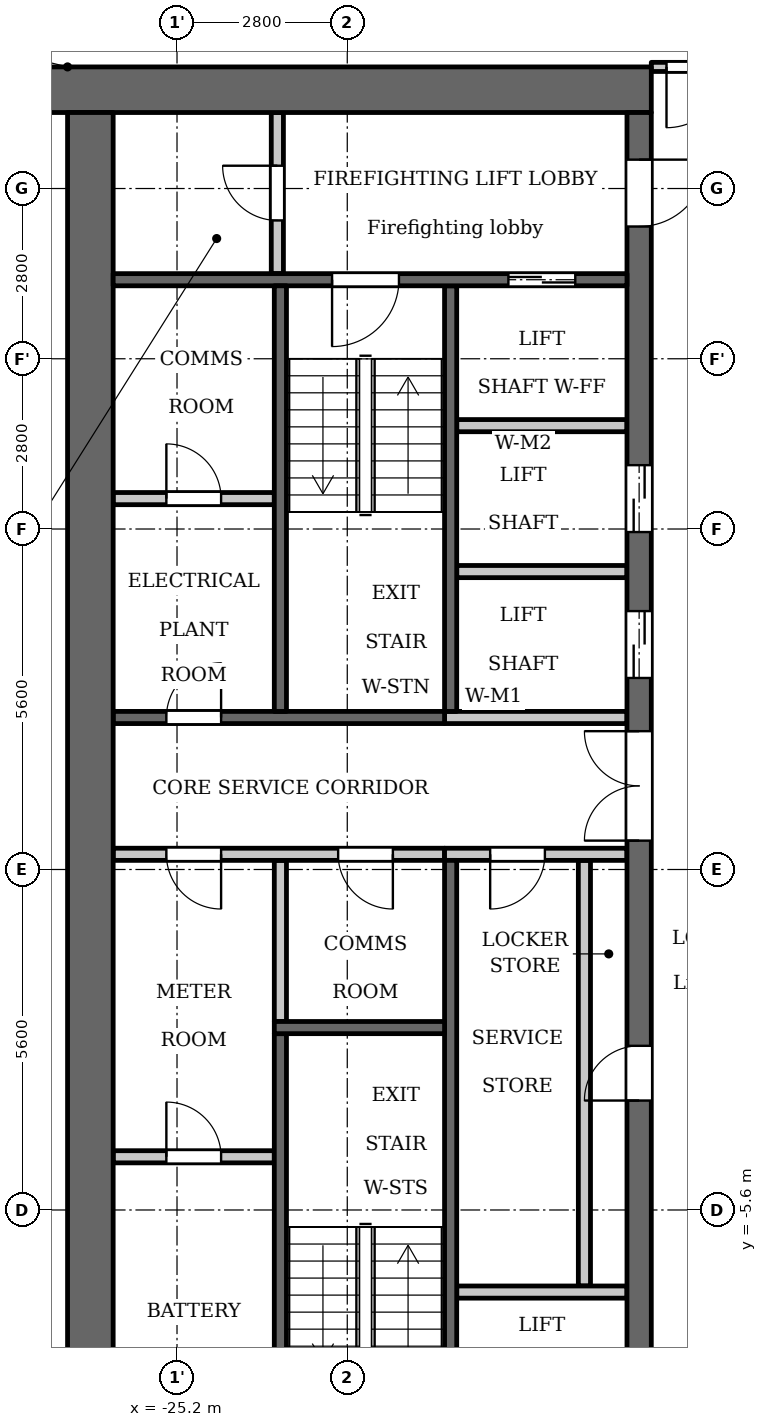
"""IFC4 building model, lengths in metres.
Left out: names, types, materials, properties, quantities, classifications, styles, units other than length and angle.
Written with IfcOpenShell. Run it as: python <this file> out.ifc"""

import sys

from ifc_helpers import new_model, si_unit, direction, frame, frame_2d, origin, place, context, subcontext, project, spatial, rectangle, extrude, element, fill, save


model = new_model("IFC4")
c1 = context("Model", 3, precision=1e-05, world=origin(), true_north=direction((0.0, 1.0)))
c2 = subcontext(c1, "Body", "Model", "MODEL_VIEW")
j1 = project(units=[si_unit("LENGTHUNIT", "METRE"), si_unit("PLANEANGLEUNIT", "RADIAN")], contexts=[c1])
p1 = place(None, origin())
s1 = spatial("IfcSite", under=j1, at=p1, CompositionType="ELEMENT")
p2 = place(p1, origin())
s2 = spatial("IfcBuilding", under=s1, at=p2, CompositionType="ELEMENT")
p3 = place(p2, frame((0.0, 0.0, 160.6)))
s3 = spatial("IfcBuildingStorey", under=s2, at=p3, CompositionType="ELEMENT", Elevation=160.6)
p4 = place(p3, frame((-23.5, -2.5, 0.0), z_axis=(0.0, 0.0, 1.0), x_axis=(0.0, 1.0, 0.0)))
e1 = element("IfcWall", 1, at=p4, inside=s3, PredefinedType="PARTITIONING", context=c2, shape_type="SweptSolid", body=[
    extrude(rectangle(XDim=2.65, YDim=0.2, at=frame_2d((1.325, 0.0))), origin(), (0.0, 0.0, 1.0), 3.2),
])
p5 = place(p3, frame((-20.7, 2.6, 0.0), z_axis=(0.0, 0.0, 1.0), x_axis=(0.0, 1.0, 0.0)))
e2 = element("IfcWall", 2, at=p5, inside=s3, PredefinedType="SHEAR", context=c2, shape_type="SweptSolid", body=[
    extrude(rectangle(XDim=7.0, YDim=0.2, at=frame_2d((3.5, 0.0))), origin(), (0.0, 0.0, 1.0), 3.2),
])
p6 = place(p3, frame((-20.7, -9.6, 0.0), z_axis=(0.0, 0.0, 1.0), x_axis=(0.0, 1.0, 0.0)))
e3 = element("IfcWall", 3, at=p6, inside=s3, PredefinedType="SHEAR", context=c2, shape_type="SweptSolid", body=[
    extrude(rectangle(XDim=9.75, YDim=0.2, at=frame_2d((4.875, 0.0))), origin(), (0.0, 0.0, 1.0), 3.2),
])
p7 = place(p3, frame((-20.8, 2.5, 0.0), z_axis=(0.0, 0.0, 1.0), x_axis=(-1.0, 0.0, 0.0)))
e4 = element("IfcWall", 4, at=p7, inside=s3, PredefinedType="SHEAR", context=c2, shape_type="SweptSolid", body=[
    extrude(rectangle(XDim=5.45, YDim=0.2, at=frame_2d((2.725, 0.0))), origin(), (0.0, 0.0, 1.0), 3.2),
])
p8 = place(p7, frame((3.675, 0.0, 0.0)))
e5 = element("IfcOpeningElement", 5, at=p8, cuts=e4, PredefinedType="OPENING", context=c2, shape_type="SweptSolid", body=[
    extrude(rectangle(XDim=0.9, YDim=2.1, at=frame_2d((0.45, 1.05))), frame((0.0, 0.11, 0.0), z_axis=(0.0, -1.0, 0.0), x_axis=(1.0, 0.0, 0.0)), (0.0, 0.0, 1.0), 0.22),
])
p9 = place(p3, frame((-20.8, 0.25, 0.0), z_axis=(0.0, 0.0, 1.0), x_axis=(-1.0, 0.0, 0.0)))
e6 = element("IfcWall", 6, at=p9, inside=s3, PredefinedType="PARTITIONING", context=c2, shape_type="SweptSolid", body=[
    extrude(rectangle(XDim=5.45, YDim=0.2, at=frame_2d((2.725, 0.0))), origin(), (0.0, 0.0, 1.0), 3.2),
])
p10 = place(p9, frame((0.85, 0.0, 0.0)))
e7 = element("IfcOpeningElement", 7, at=p10, cuts=e6, PredefinedType="OPENING", context=c2, shape_type="SweptSolid", body=[
    extrude(rectangle(XDim=0.9, YDim=2.1, at=frame_2d((0.45, 1.05))), frame((0.0, 0.11, 0.0), z_axis=(0.0, -1.0, 0.0), x_axis=(1.0, 0.0, 0.0)), (0.0, 0.0, 1.0), 0.22),
])
p11 = place(p9, frame((3.675, 0.0, 0.0)))
e8 = element("IfcOpeningElement", 8, at=p11, cuts=e6, PredefinedType="OPENING", context=c2, shape_type="SweptSolid", body=[
    extrude(rectangle(XDim=0.9, YDim=2.1, at=frame_2d((0.45, 1.05))), frame((0.0, 0.11, 0.0), z_axis=(0.0, -1.0, 0.0), x_axis=(1.0, 0.0, 0.0)), (0.0, 0.0, 1.0), 0.22),
])
p12 = place(p3, frame((-17.4, 12.825, 0.0), z_axis=(0.0, 0.0, 1.0), x_axis=(-1.0, 0.0, 0.0)))
e9 = element("IfcWall", 9, at=p12, inside=s3, PredefinedType="SHEAR", context=c2, shape_type="SweptSolid", body=[
    extrude(rectangle(XDim=10.4, YDim=0.75, at=frame_2d((5.2, 0.0))), origin(), (0.0, 0.0, 1.0), 3.2),
])
p13 = place(p3, frame((-18.5, -6.85, 0.0), z_axis=(0.0, 0.0, 1.0), x_axis=(0.0, 1.0, 0.0)))
e10 = element("IfcWall", 10, at=p13, inside=s3, PredefinedType="PARTITIONING", context=c2, shape_type="SweptSolid", body=[
    extrude(rectangle(XDim=7.0, YDim=0.2, at=frame_2d((3.5, 0.0))), origin(), (0.0, 0.0, 1.0), 3.2),
])
p14 = place(p3, frame((-17.6, -12.45, 0.0), z_axis=(0.0, 0.0, 1.0), x_axis=(0.0, 1.0, 0.0)))
e11 = element("IfcWall", 11, at=p14, inside=s3, PredefinedType="SHEAR", context=c2, shape_type="SweptSolid", body=[
    extrude(rectangle(XDim=24.9, YDim=0.4, at=frame_2d((12.45, 0.0))), origin(), (0.0, 0.0, 1.0), 3.2),
])
p15 = place(p14, frame((8.65, 0.0, 0.0)))
e12 = element("IfcOpeningElement", 12, at=p15, cuts=e11, PredefinedType="OPENING", context=c2, shape_type="SweptSolid", body=[
    extrude(rectangle(XDim=0.9, YDim=2.1, at=frame_2d((0.45, 1.05))), frame((0.0, 0.21, 0.0), z_axis=(0.0, -1.0, 0.0), x_axis=(1.0, 0.0, 0.0)), (0.0, 0.0, 1.0), 0.42),
])
p16 = place(p14, frame((15.6, 0.0, 0.0)))
e13 = element("IfcOpeningElement", 13, at=p16, cuts=e11, PredefinedType="OPENING", context=c2, shape_type="SweptSolid", body=[
    extrude(rectangle(XDim=1.1, YDim=2.1, at=frame_2d((0.55, 1.05))), frame((0.0, 0.21, 0.0), z_axis=(0.0, -1.0, 0.0), x_axis=(1.0, 0.0, 0.0)), (0.0, 0.0, 1.0), 0.42),
])
p17 = place(p14, frame((18.0, 0.0, 0.0)))
e14 = element("IfcOpeningElement", 14, at=p17, cuts=e11, PredefinedType="OPENING", context=c2, shape_type="SweptSolid", body=[
    extrude(rectangle(XDim=1.1, YDim=2.1, at=frame_2d((0.55, 1.05))), frame((0.0, 0.21, 0.0), z_axis=(0.0, -1.0, 0.0), x_axis=(1.0, 0.0, 0.0)), (0.0, 0.0, 1.0), 0.42),
])
p18 = place(p14, frame((23.025, 0.0, 0.0)))
e15 = element("IfcOpeningElement", 15, at=p18, cuts=e11, PredefinedType="OPENING", context=c2, shape_type="SweptSolid", body=[
    extrude(rectangle(XDim=1.1, YDim=2.1, at=frame_2d((0.55, 1.05))), frame((0.0, 0.21, 0.0), z_axis=(0.0, -1.0, 0.0), x_axis=(1.0, 0.0, 0.0)), (0.0, 0.0, 1.0), 0.42),
])
p19 = place(p14, frame((0.775, 0.0, 0.0)))
e16 = element("IfcOpeningElement", 16, at=p19, cuts=e11, PredefinedType="OPENING", context=c2, shape_type="SweptSolid", body=[
    extrude(rectangle(XDim=1.1, YDim=2.1, at=frame_2d((0.55, 1.05))), frame((0.0, 0.21, 0.0), z_axis=(0.0, -1.0, 0.0), x_axis=(1.0, 0.0, 0.0)), (0.0, 0.0, 1.0), 0.42),
])
p20 = place(p14, frame((12.925, 0.0, 0.0)))
e17 = element("IfcOpeningElement", 17, at=p20, cuts=e11, PredefinedType="OPENING", context=c2, shape_type="SweptSolid", body=[
    extrude(rectangle(XDim=1.8, YDim=2.1, at=frame_2d((0.9, 1.05))), frame((0.0, 0.21, 0.0), z_axis=(0.0, -1.0, 0.0), x_axis=(1.0, 0.0, 0.0)), (0.0, 0.0, 1.0), 0.42),
])
p21 = place(p3, frame((-26.625, -12.45, 0.0), z_axis=(0.0, 0.0, 1.0), x_axis=(0.0, 1.0, 0.0)))
e18 = element("IfcWall", 18, at=p21, inside=s3, PredefinedType="SHEAR", context=c2, shape_type="SweptSolid", body=[
    extrude(rectangle(XDim=24.9, YDim=0.75, at=frame_2d((12.45, 0.0))), origin(), (0.0, 0.0, 1.0), 3.2),
])
p22 = place(p3, frame((-23.55, 9.8, 0.0), z_axis=(0.0, 0.0, 1.0), x_axis=(0.0, 1.0, 0.0)))
e19 = element("IfcWall", 19, at=p22, inside=s3, PredefinedType="PARTITIONING", context=c2, shape_type="SweptSolid", body=[
    extrude(rectangle(XDim=2.65, YDim=0.2, at=frame_2d((1.325, 0.0))), origin(), (0.0, 0.0, 1.0), 3.2),
])
p23 = place(p22, frame((0.875, 0.0, 0.0)))
e20 = element("IfcOpeningElement", 20, at=p23, cuts=e19, PredefinedType="OPENING", context=c2, shape_type="SweptSolid", body=[
    extrude(rectangle(XDim=0.9, YDim=2.1, at=frame_2d((0.45, 1.05))), frame((0.0, 0.11, 0.0), z_axis=(0.0, -1.0, 0.0), x_axis=(1.0, 0.0, 0.0)), (0.0, 0.0, 1.0), 0.22),
])
p24 = place(p3, frame((-23.6, -4.725, 0.0), z_axis=(0.0, 0.0, 1.0), x_axis=(-1.0, 0.0, 0.0)))
e21 = element("IfcWall", 21, at=p24, inside=s3, PredefinedType="PARTITIONING", context=c2, shape_type="SweptSolid", body=[
    extrude(rectangle(XDim=2.65, YDim=0.2, at=frame_2d((1.325, 0.0))), origin(), (0.0, 0.0, 1.0), 3.2),
])
p25 = place(p24, frame((0.875, 0.0, 0.0)))
e22 = element("IfcOpeningElement", 22, at=p25, cuts=e21, PredefinedType="OPENING", context=c2, shape_type="SweptSolid", body=[
    extrude(rectangle(XDim=0.9, YDim=2.1, at=frame_2d((0.45, 1.05))), frame((0.0, 0.11, 0.0), z_axis=(0.0, -1.0, 0.0), x_axis=(1.0, 0.0, 0.0)), (0.0, 0.0, 1.0), 0.22),
])
p26 = place(p3, frame((-23.6, 6.1, 0.0), z_axis=(0.0, 0.0, 1.0), x_axis=(-1.0, 0.0, 0.0)))
e23 = element("IfcWall", 23, at=p26, inside=s3, PredefinedType="PARTITIONING", context=c2, shape_type="SweptSolid", body=[
    extrude(rectangle(XDim=2.65, YDim=0.2, at=frame_2d((1.325, 0.0))), origin(), (0.0, 0.0, 1.0), 3.2),
])
p27 = place(p26, frame((0.875, 0.0, 0.0)))
e24 = element("IfcOpeningElement", 24, at=p27, cuts=e23, PredefinedType="OPENING", context=c2, shape_type="SweptSolid", body=[
    extrude(rectangle(XDim=0.9, YDim=2.1, at=frame_2d((0.45, 1.05))), frame((0.0, 0.11, 0.0), z_axis=(0.0, -1.0, 0.0), x_axis=(1.0, 0.0, 0.0)), (0.0, 0.0, 1.0), 0.22),
])
p28 = place(p3, frame((-17.8, -6.95, 0.0), z_axis=(0.0, 0.0, 1.0), x_axis=(-1.0, 0.0, 0.0)))
e25 = element("IfcWall", 25, at=p28, inside=s3, PredefinedType="PARTITIONING", context=c2, shape_type="SweptSolid", body=[
    extrude(rectangle(XDim=2.8, YDim=0.2, at=frame_2d((1.4, 0.0))), origin(), (0.0, 0.0, 1.0), 3.2),
])
p29 = place(p3, frame((-17.8, 0.25, 0.0), z_axis=(0.0, 0.0, 1.0), x_axis=(-1.0, 0.0, 0.0)))
e26 = element("IfcWall", 26, at=p29, inside=s3, PredefinedType="PARTITIONING", context=c2, shape_type="SweptSolid", body=[
    extrude(rectangle(XDim=3.0, YDim=0.2, at=frame_2d((1.5, 0.0))), origin(), (0.0, 0.0, 1.0), 3.2),
])
p30 = place(p29, frame((1.35, 0.0, 0.0)))
e27 = element("IfcOpeningElement", 27, at=p30, cuts=e26, PredefinedType="OPENING", context=c2, shape_type="SweptSolid", body=[
    extrude(rectangle(XDim=0.9, YDim=2.1, at=frame_2d((0.45, 1.05))), frame((0.0, 0.11, 0.0), z_axis=(0.0, -1.0, 0.0), x_axis=(1.0, 0.0, 0.0)), (0.0, 0.0, 1.0), 0.22),
])
p31 = place(p3, frame((-17.8, 2.5, 0.0), z_axis=(0.0, 0.0, 1.0), x_axis=(-1.0, 0.0, 0.0)))
e28 = element("IfcWall", 28, at=p31, inside=s3, PredefinedType="PARTITIONING", context=c2, shape_type="SweptSolid", body=[
    extrude(rectangle(XDim=3.0, YDim=0.2, at=frame_2d((1.5, 0.0))), origin(), (0.0, 0.0, 1.0), 3.2),
])
for number, where, z_axis, x_axis in (
    (29, (-17.8, 4.9, 0.0), (0.0, 0.0, 1.0), (-1.0, 0.0, 0.0)),
    (30, (-17.8, 7.3, 0.0), (0.0, 0.0, 1.0), (-1.0, 0.0, 0.0)),
):
    element("IfcWall", number, at=place(p3, frame(where, z_axis=z_axis, x_axis=x_axis)), inside=s3, PredefinedType="PARTITIONING", context=c2, shape_type="SweptSolid", body=[
        extrude(rectangle(XDim=2.8, YDim=0.2, at=frame_2d((1.4, 0.0))), origin(), (0.0, 0.0, 1.0), 3.2),
    ])
p32 = place(p3, frame((-17.8, 9.7, 0.0), z_axis=(0.0, 0.0, 1.0), x_axis=(-1.0, 0.0, 0.0)))
e31 = element("IfcWall", 31, at=p32, inside=s3, PredefinedType="SHEAR", context=c2, shape_type="SweptSolid", body=[
    extrude(rectangle(XDim=8.45, YDim=0.2, at=frame_2d((4.225, 0.0))), origin(), (0.0, 0.0, 1.0), 3.2),
])
p33 = place(p32, frame((0.85, 0.0, 0.0)))
e32 = element("IfcOpeningElement", 32, at=p33, cuts=e31, PredefinedType="OPENING", context=c2, shape_type="SweptSolid", body=[
    extrude(rectangle(XDim=1.1, YDim=2.1, at=frame_2d((0.55, 1.05))), frame((0.0, 0.11, 0.0), z_axis=(0.0, -1.0, 0.0), x_axis=(1.0, 0.0, 0.0)), (0.0, 0.0, 1.0), 0.22),
])
p34 = place(p32, frame((3.75, 0.0, 0.0)))
e33 = element("IfcOpeningElement", 33, at=p34, cuts=e31, PredefinedType="OPENING", context=c2, shape_type="SweptSolid", body=[
    extrude(rectangle(XDim=1.1, YDim=2.1, at=frame_2d((0.55, 1.05))), frame((0.0, 0.11, 0.0), z_axis=(0.0, -1.0, 0.0), x_axis=(1.0, 0.0, 0.0)), (0.0, 0.0, 1.0), 0.22),
])
p35 = place(p3, frame((-23.5, 2.6, 0.0), z_axis=(0.0, 0.0, 1.0), x_axis=(0.0, 1.0, 0.0)))
e34 = element("IfcWall", 34, at=p35, inside=s3, PredefinedType="SHEAR", context=c2, shape_type="SweptSolid", body=[
    extrude(rectangle(XDim=7.0, YDim=0.2, at=frame_2d((3.5, 0.0))), origin(), (0.0, 0.0, 1.0), 3.2),
])
p36 = place(p3, frame((-23.5, -9.6, 0.0), z_axis=(0.0, 0.0, 1.0), x_axis=(0.0, 1.0, 0.0)))
e35 = element("IfcWall", 35, at=p36, inside=s3, PredefinedType="SHEAR", context=c2, shape_type="SweptSolid", body=[
    extrude(rectangle(XDim=6.9, YDim=0.2, at=frame_2d((3.45, 0.0))), origin(), (0.0, 0.0, 1.0), 3.2),
])
p37 = place(p3, frame((-20.8, -2.6, 0.0), z_axis=(0.0, 0.0, 1.0), x_axis=(-1.0, 0.0, 0.0)))
e36 = element("IfcWall", 36, at=p37, inside=s3, PredefinedType="SHEAR", context=c2, shape_type="SweptSolid", body=[
    extrude(rectangle(XDim=2.8, YDim=0.2, at=frame_2d((1.4, 0.0))), origin(), (0.0, 0.0, 1.0), 3.2),
])
p38 = place(p3, frame((-17.4, 13.2, 0.0), z_axis=(0.0, 0.0, 1.0), x_axis=(1.0, 0.0, 0.0)))
e37 = element("IfcWall", 37, at=p38, inside=s3, PredefinedType="PARTITIONING", context=c2, shape_type="SweptSolid", body=[
    extrude(rectangle(XDim=34.8, YDim=0.15, at=frame_2d((17.4, 0.0))), origin(), (0.0, 0.0, 1.0), 3.2),
])
p39 = place(p38, frame((0.25, 0.0, 0.0)))
e38 = element("IfcOpeningElement", 38, at=p39, cuts=e37, PredefinedType="OPENING", context=c2, shape_type="SweptSolid", body=[
    extrude(rectangle(XDim=1.0, YDim=2.1, at=frame_2d((0.5, 1.05))), frame((0.0, 0.085, 0.0), z_axis=(0.0, -1.0, 0.0), x_axis=(1.0, 0.0, 0.0)), (0.0, 0.0, 1.0), 0.17),
])
p40 = place(p38, frame((33.65, 0.0, 0.0)))
e39 = element("IfcOpeningElement", 39, at=p40, cuts=e37, PredefinedType="OPENING", context=c2, shape_type="SweptSolid", body=[
    extrude(rectangle(XDim=1.0, YDim=2.1, at=frame_2d((0.5, 1.05))), frame((0.0, 0.085, 0.0), z_axis=(0.0, -1.0, 0.0), x_axis=(1.0, 0.0, 0.0)), (0.0, 0.0, 1.0), 0.17),
])
p41 = place(p38, frame((15.75, 0.0, 0.0)))
e40 = element("IfcOpeningElement", 40, at=p41, cuts=e37, PredefinedType="OPENING", context=c2, shape_type="SweptSolid", body=[
    extrude(rectangle(XDim=1.0, YDim=2.1, at=frame_2d((0.5, 1.05))), frame((0.0, 0.085, 0.0), z_axis=(0.0, -1.0, 0.0), x_axis=(1.0, 0.0, 0.0)), (0.0, 0.0, 1.0), 0.17),
])
p42 = place(p38, frame((20.85, 0.0, 0.0)))
e41 = element("IfcOpeningElement", 41, at=p42, cuts=e37, PredefinedType="OPENING", context=c2, shape_type="SweptSolid", body=[
    extrude(rectangle(XDim=1.0, YDim=2.1, at=frame_2d((0.5, 1.05))), frame((0.0, 0.085, 0.0), z_axis=(0.0, -1.0, 0.0), x_axis=(1.0, 0.0, 0.0)), (0.0, 0.0, 1.0), 0.17),
])
p43 = place(p38, frame((23.55, 0.0, 0.0)))
e42 = element("IfcOpeningElement", 42, at=p43, cuts=e37, PredefinedType="OPENING", context=c2, shape_type="SweptSolid", body=[
    extrude(rectangle(XDim=1.0, YDim=2.1, at=frame_2d((0.5, 1.05))), frame((0.0, 0.085, 0.0), z_axis=(0.0, -1.0, 0.0), x_axis=(1.0, 0.0, 0.0)), (0.0, 0.0, 1.0), 0.17),
])
p44 = place(p15, origin())
e43 = element("IfcDoor", 43, at=p44, inside=s3, OperationType="SINGLE_SWING_RIGHT", PredefinedType="DOOR", context=c2, shape_type="SweptSolid", body=[
    extrude(rectangle(XDim=0.9, YDim=2.1, at=frame_2d((0.45, 1.05))), frame((0.0, 0.025, 0.0), z_axis=(0.0, -1.0, 0.0), x_axis=(1.0, 0.0, 0.0)), (0.0, 0.0, 1.0), 0.05),
])
fill(e12, e43)
p45 = place(p30, origin())
e44 = element("IfcDoor", 44, at=p45, inside=s3, OperationType="SINGLE_SWING_LEFT", PredefinedType="DOOR", context=c2, shape_type="SweptSolid", body=[
    extrude(rectangle(XDim=0.9, YDim=2.1, at=frame_2d((0.45, 1.05))), frame((0.0, 0.025, 0.0), z_axis=(0.0, -1.0, 0.0), x_axis=(1.0, 0.0, 0.0)), (0.0, 0.0, 1.0), 0.05),
])
fill(e27, e44)
p46 = place(p16, origin())
e45 = element("IfcDoor", 45, at=p46, inside=s3, OperationType="DOUBLE_DOOR_SLIDING", PredefinedType="DOOR", context=c2, shape_type="SweptSolid", body=[
    extrude(rectangle(XDim=1.1, YDim=2.1, at=frame_2d((0.55, 1.05))), frame((0.0, 0.025, 0.0), z_axis=(0.0, -1.0, 0.0), x_axis=(1.0, 0.0, 0.0)), (0.0, 0.0, 1.0), 0.05),
])
fill(e13, e45)
p47 = place(p17, origin())
e46 = element("IfcDoor", 46, at=p47, inside=s3, OperationType="DOUBLE_DOOR_SLIDING", PredefinedType="DOOR", context=c2, shape_type="SweptSolid", body=[
    extrude(rectangle(XDim=1.1, YDim=2.1, at=frame_2d((0.55, 1.05))), frame((0.0, 0.025, 0.0), z_axis=(0.0, -1.0, 0.0), x_axis=(1.0, 0.0, 0.0)), (0.0, 0.0, 1.0), 0.05),
])
fill(e14, e46)
p48 = place(p33, origin())
e47 = element("IfcDoor", 47, at=p48, inside=s3, OperationType="DOUBLE_DOOR_SLIDING", PredefinedType="DOOR", context=c2, shape_type="SweptSolid", body=[
    extrude(rectangle(XDim=1.1, YDim=2.1, at=frame_2d((0.55, 1.05))), frame((0.0, 0.025, 0.0), z_axis=(0.0, -1.0, 0.0), x_axis=(1.0, 0.0, 0.0)), (0.0, 0.0, 1.0), 0.05),
])
fill(e32, e47)
p49 = place(p18, origin())
e48 = element("IfcDoor", 48, at=p49, inside=s3, OperationType="SINGLE_SWING_RIGHT", PredefinedType="DOOR", context=c2, shape_type="SweptSolid", body=[
    extrude(rectangle(XDim=1.1, YDim=2.1, at=frame_2d((0.55, 1.05))), frame((0.0, 0.025, 0.0), z_axis=(0.0, -1.0, 0.0), x_axis=(1.0, 0.0, 0.0)), (0.0, 0.0, 1.0), 0.05),
])
fill(e15, e48)
p50 = place(p23, origin())
e49 = element("IfcDoor", 49, at=p50, inside=s3, OperationType="SINGLE_SWING_LEFT", PredefinedType="DOOR", context=c2, shape_type="SweptSolid", body=[
    extrude(rectangle(XDim=0.9, YDim=2.1, at=frame_2d((0.45, 1.05))), frame((0.0, 0.025, 0.0), z_axis=(0.0, -1.0, 0.0), x_axis=(1.0, 0.0, 0.0)), (0.0, 0.0, 1.0), 0.05),
])
fill(e20, e49)
p51 = place(p34, origin())
e50 = element("IfcDoor", 50, at=p51, inside=s3, OperationType="SINGLE_SWING_LEFT", PredefinedType="DOOR", context=c2, shape_type="SweptSolid", body=[
    extrude(rectangle(XDim=1.1, YDim=2.1, at=frame_2d((0.55, 1.05))), frame((0.0, 0.025, 0.0), z_axis=(0.0, -1.0, 0.0), x_axis=(1.0, 0.0, 0.0)), (0.0, 0.0, 1.0), 0.05),
])
fill(e33, e50)
p52 = place(p20, origin())
e51 = element("IfcDoor", 51, at=p52, inside=s3, OperationType="DOUBLE_DOOR_SINGLE_SWING", PredefinedType="DOOR", context=c2, shape_type="SweptSolid", body=[
    extrude(rectangle(XDim=1.8, YDim=2.1, at=frame_2d((0.9, 1.05))), frame((0.0, 0.025, 0.0), z_axis=(0.0, -1.0, 0.0), x_axis=(1.0, 0.0, 0.0)), (0.0, 0.0, 1.0), 0.05),
])
fill(e17, e51)
p53 = place(p10, origin())
e52 = element("IfcDoor", 52, at=p53, inside=s3, OperationType="SINGLE_SWING_RIGHT", PredefinedType="DOOR", context=c2, shape_type="SweptSolid", body=[
    extrude(rectangle(XDim=0.9, YDim=2.1, at=frame_2d((0.45, 1.05))), frame((0.0, 0.025, 0.0), z_axis=(0.0, -1.0, 0.0), x_axis=(1.0, 0.0, 0.0)), (0.0, 0.0, 1.0), 0.05),
])
fill(e7, e52)
p54 = place(p25, origin())
e53 = element("IfcDoor", 53, at=p54, inside=s3, OperationType="SINGLE_SWING_RIGHT", PredefinedType="DOOR", context=c2, shape_type="SweptSolid", body=[
    extrude(rectangle(XDim=0.9, YDim=2.1, at=frame_2d((0.45, 1.05))), frame((0.0, 0.025, 0.0), z_axis=(0.0, -1.0, 0.0), x_axis=(1.0, 0.0, 0.0)), (0.0, 0.0, 1.0), 0.05),
])
fill(e22, e53)
p55 = place(p11, origin())
e54 = element("IfcDoor", 54, at=p55, inside=s3, OperationType="SINGLE_SWING_RIGHT", PredefinedType="DOOR", context=c2, shape_type="SweptSolid", body=[
    extrude(rectangle(XDim=0.9, YDim=2.1, at=frame_2d((0.45, 1.05))), frame((0.0, 0.025, 0.0), z_axis=(0.0, -1.0, 0.0), x_axis=(1.0, 0.0, 0.0)), (0.0, 0.0, 1.0), 0.05),
])
fill(e8, e54)
p56 = place(p27, origin())
e55 = element("IfcDoor", 55, at=p56, inside=s3, OperationType="SINGLE_SWING_RIGHT", PredefinedType="DOOR", context=c2, shape_type="SweptSolid", body=[
    extrude(rectangle(XDim=0.9, YDim=2.1, at=frame_2d((0.45, 1.05))), frame((0.0, 0.025, 0.0), z_axis=(0.0, -1.0, 0.0), x_axis=(1.0, 0.0, 0.0)), (0.0, 0.0, 1.0), 0.05),
])
fill(e24, e55)
p57 = place(p8, origin())
e56 = element("IfcDoor", 56, at=p57, inside=s3, OperationType="SINGLE_SWING_LEFT", PredefinedType="DOOR", context=c2, shape_type="SweptSolid", body=[
    extrude(rectangle(XDim=0.9, YDim=2.1, at=frame_2d((0.45, 1.05))), frame((0.0, 0.025, 0.0), z_axis=(0.0, -1.0, 0.0), x_axis=(1.0, 0.0, 0.0)), (0.0, 0.0, 1.0), 0.05),
])
fill(e5, e56)
p58 = place(p39, origin())
e57 = element("IfcDoor", 57, at=p58, inside=s3, OperationType="SINGLE_SWING_LEFT", PredefinedType="DOOR", context=c2, shape_type="SweptSolid", body=[
    extrude(rectangle(XDim=1.0, YDim=2.1, at=frame_2d((0.5, 1.05))), frame((0.0, 0.025, 0.0), z_axis=(0.0, -1.0, 0.0), x_axis=(1.0, 0.0, 0.0)), (0.0, 0.0, 1.0), 0.05),
])
fill(e38, e57)
save(model, sys.argv[1])
